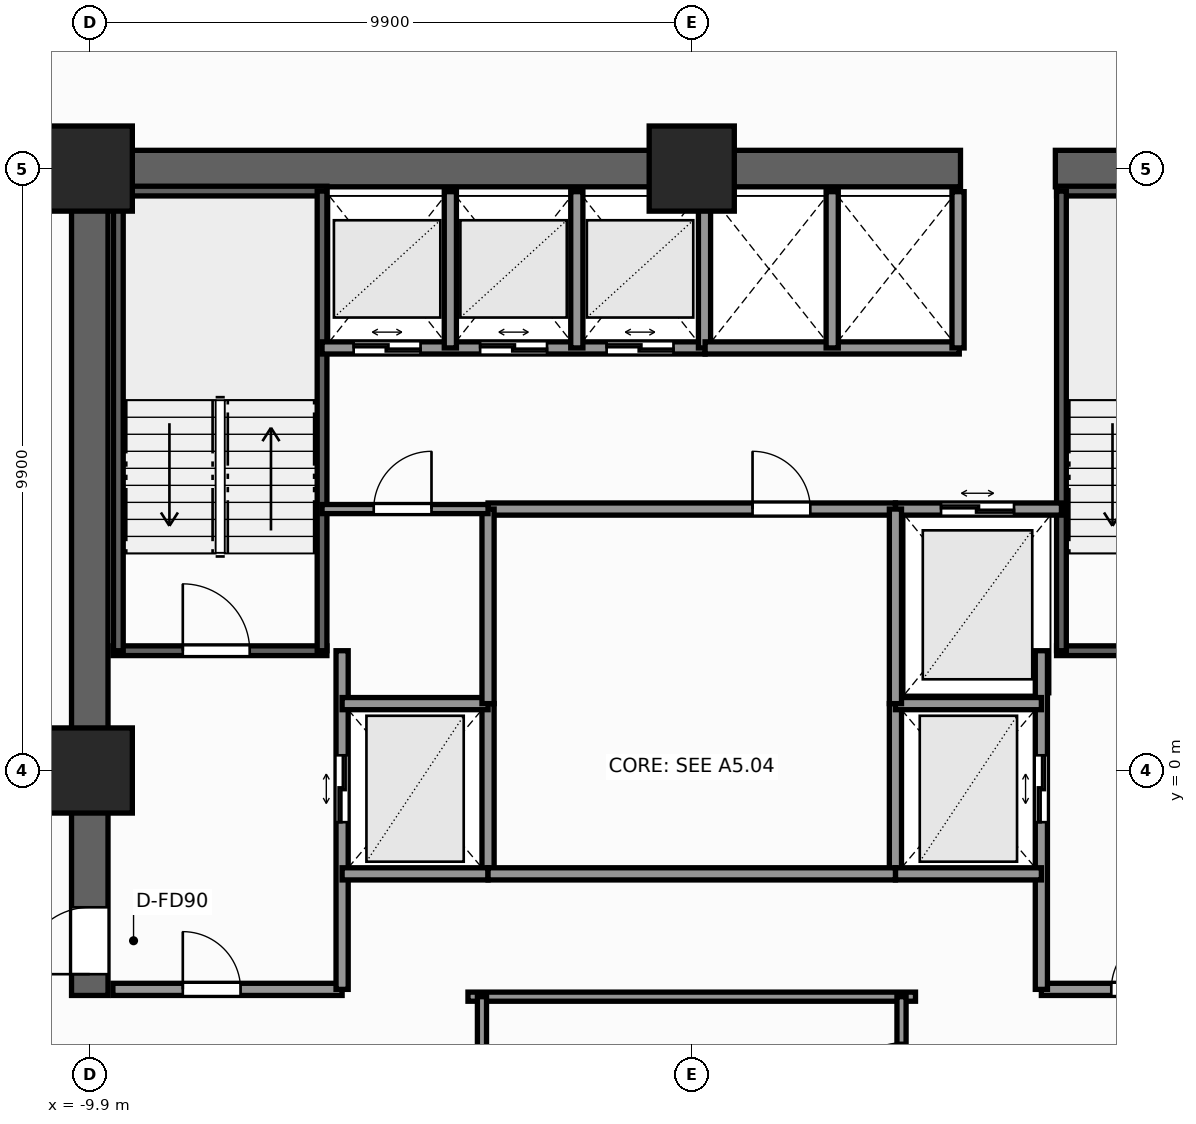
"""IFC4 building model, lengths in metres.
Left out: names, types, materials, properties, quantities, classifications, styles, units other than length and angle.
Written with IfcOpenShell. Run it as: python <this file> out.ifc"""

import sys

from ifc_helpers import new_model, si_unit, direction, frame, frame_2d, origin, origin_2d, place, context, subcontext, project, spatial, rectangle, extrude, element, fill, save


model = new_model("IFC4")
c1 = context("Model", 3, precision=1e-05, world=origin(), true_north=direction((0.0, 1.0)))
c2 = subcontext(c1, "Body", "Model", "MODEL_VIEW")
j1 = project(units=[si_unit("LENGTHUNIT", "METRE"), si_unit("PLANEANGLEUNIT", "RADIAN")], contexts=[c1])
p1 = place(None, origin())
s1 = spatial("IfcSite", under=j1, at=p1, CompositionType="ELEMENT")
p2 = place(p1, origin())
s2 = spatial("IfcBuilding", under=s1, at=p2, CompositionType="ELEMENT")
p3 = place(p2, frame((0.0, 0.0, 30.4)))
s3 = spatial("IfcBuildingStorey", under=s2, at=p3, CompositionType="ELEMENT", Elevation=30.4)
p4 = place(p3, frame((-10.2, 9.9, 0.0), z_axis=(0.0, 0.0, 1.0), x_axis=(1.0, 0.0, 0.0)))
e1 = element("IfcWall", 1, at=p4, inside=s3, PredefinedType="SHEAR", context=c2, shape_type="SweptSolid", body=[
    extrude(rectangle(XDim=14.62, YDim=0.6, at=frame_2d((7.31, 0.0))), origin(), (0.0, 0.0, 1.0), 3.3),
])
p5 = place(p3, frame((5.98, 9.9, 0.0), z_axis=(0.0, 0.0, 1.0), x_axis=(1.0, 0.0, 0.0)))
e2 = element("IfcWall", 2, at=p5, inside=s3, PredefinedType="SHEAR", context=c2, shape_type="SweptSolid", body=[
    extrude(rectangle(XDim=4.22, YDim=0.6, at=frame_2d((2.11, 0.0))), origin(), (0.0, 0.0, 1.0), 3.3),
])
p6 = place(p3, frame((-9.9, -3.7, 0.0), z_axis=(0.0, 0.0, 1.0), x_axis=(0.0, 1.0, 0.0)))
e3 = element("IfcWall", 3, at=p6, inside=s3, PredefinedType="SHEAR", context=c2, shape_type="SweptSolid", body=[
    extrude(rectangle(XDim=13.3, YDim=0.6, at=frame_2d((6.65, 0.0))), origin(), (0.0, 0.0, 1.0), 3.3),
])
p7 = place(p6, frame((0.35, 0.0, 0.0)))
e4 = element("IfcOpeningElement", 4, at=p7, cuts=e3, PredefinedType="OPENING", context=c2, shape_type="SweptSolid", body=[
    extrude(rectangle(XDim=1.1, YDim=2.2, at=frame_2d((0.55, 1.1))), frame((0.0, 0.31, 0.0), z_axis=(0.0, -1.0, 0.0), x_axis=(1.0, 0.0, 0.0)), (0.0, 0.0, 1.0), 0.62),
])
for number, where, z_axis, x_axis in (
    (5, (-9.9, 9.9, 0.0), (0.0, 0.0, 1.0), (1.0, 0.0, 0.0)),
    (6, (0.0, 9.9, 0.0), (0.0, 0.0, 1.0), (1.0, 0.0, 0.0)),
    (7, (-9.9, 0.0, 0.0), (0.0, 0.0, 1.0), (1.0, 0.0, 0.0)),
):
    element("IfcColumn", number, at=place(p3, frame(where, z_axis=z_axis, x_axis=x_axis)), inside=s3, PredefinedType="COLUMN", context=c2, shape_type="SweptSolid", body=[
        extrude(rectangle(XDim=1.4, YDim=1.4, at=origin_2d()), origin(), (0.0, 0.0, 1.0), 3.3),
    ])
p8 = place(p3, frame((-9.52, 1.97, 0.0), z_axis=(0.0, 0.0, 1.0), x_axis=(1.0, 0.0, 0.0)))
e8 = element("IfcWall", 8, at=p8, inside=s3, PredefinedType="SHEAR", context=c2, shape_type="SweptSolid", body=[
    extrude(rectangle(XDim=3.52, YDim=0.16, at=frame_2d((1.76, 0.0))), origin(), (0.0, 0.0, 1.0), 3.3),
])
p9 = place(p8, frame((1.15, 0.0, 0.0)))
e9 = element("IfcOpeningElement", 9, at=p9, cuts=e8, PredefinedType="OPENING", context=c2, shape_type="SweptSolid", body=[
    extrude(rectangle(XDim=1.1, YDim=2.2, at=frame_2d((0.55, 1.1))), frame((0.0, 0.09, 0.0), z_axis=(0.0, -1.0, 0.0), x_axis=(1.0, 0.0, 0.0)), (0.0, 0.0, 1.0), 0.18),
])
p10 = place(p3, frame((-9.52, 9.53, 0.0), z_axis=(0.0, 0.0, 1.0), x_axis=(1.0, 0.0, 0.0)))
e10 = element("IfcWall", 10, at=p10, inside=s3, PredefinedType="SHEAR", context=c2, shape_type="SweptSolid", body=[
    extrude(rectangle(XDim=3.52, YDim=0.16, at=frame_2d((1.76, 0.0))), origin(), (0.0, 0.0, 1.0), 3.3),
])
for number, where, z_axis, x_axis in (
    (11, (-9.43, 1.97, 0.0), (0.0, 0.0, 1.0), (0.0, 1.0, 0.0)),
    (12, (-6.08, 1.97, 0.0), (0.0, 0.0, 1.0), (0.0, 1.0, 0.0)),
):
    element("IfcWall", number, at=place(p3, frame(where, z_axis=z_axis, x_axis=x_axis)), inside=s3, PredefinedType="SHEAR", context=c2, shape_type="SweptSolid", body=[
        extrude(rectangle(XDim=7.56, YDim=0.16, at=frame_2d((3.78, 0.0))), origin(), (0.0, 0.0, 1.0), 3.3),
    ])
p11 = place(p3, frame((6.0, 1.97, 0.0), z_axis=(0.0, 0.0, 1.0), x_axis=(1.0, 0.0, 0.0)))
e13 = element("IfcWall", 13, at=p11, inside=s3, PredefinedType="SHEAR", context=c2, shape_type="SweptSolid", body=[
    extrude(rectangle(XDim=3.52, YDim=0.16, at=frame_2d((1.76, 0.0))), origin(), (0.0, 0.0, 1.0), 3.3),
])
p12 = place(p11, frame((1.15, 0.0, 0.0)))
e14 = element("IfcOpeningElement", 14, at=p12, cuts=e13, PredefinedType="OPENING", context=c2, shape_type="SweptSolid", body=[
    extrude(rectangle(XDim=1.1, YDim=2.2, at=frame_2d((0.55, 1.1))), frame((0.0, 0.09, 0.0), z_axis=(0.0, -1.0, 0.0), x_axis=(1.0, 0.0, 0.0)), (0.0, 0.0, 1.0), 0.18),
])
p13 = place(p3, frame((6.0, 9.53, 0.0), z_axis=(0.0, 0.0, 1.0), x_axis=(1.0, 0.0, 0.0)))
e15 = element("IfcWall", 15, at=p13, inside=s3, PredefinedType="SHEAR", context=c2, shape_type="SweptSolid", body=[
    extrude(rectangle(XDim=3.52, YDim=0.16, at=frame_2d((1.76, 0.0))), origin(), (0.0, 0.0, 1.0), 3.3),
])
p14 = place(p3, frame((6.08, 1.97, 0.0), z_axis=(0.0, 0.0, 1.0), x_axis=(0.0, 1.0, 0.0)))
e16 = element("IfcWall", 16, at=p14, inside=s3, PredefinedType="SHEAR", context=c2, shape_type="SweptSolid", body=[
    extrude(rectangle(XDim=7.56, YDim=0.16, at=frame_2d((3.78, 0.0))), origin(), (0.0, 0.0, 1.0), 3.3),
])
p15 = place(p3, frame((-9.52, -3.6, 0.0), z_axis=(0.0, 0.0, 1.0), x_axis=(1.0, 0.0, 0.0)))
e17 = element("IfcWall", 17, at=p15, inside=s3, PredefinedType="SOLIDWALL", context=c2, shape_type="SweptSolid", body=[
    extrude(rectangle(XDim=3.77, YDim=0.2, at=frame_2d((1.885, 0.0))), origin(), (0.0, 0.0, 1.0), 3.06),
])
p16 = place(p15, frame((1.15, 0.0, 0.0)))
e18 = element("IfcOpeningElement", 18, at=p16, cuts=e17, PredefinedType="OPENING", context=c2, shape_type="SweptSolid", body=[
    extrude(rectangle(XDim=0.95, YDim=2.06, at=frame_2d((0.475, 1.03))), frame((0.0, 0.11, 0.0), z_axis=(0.0, -1.0, 0.0), x_axis=(1.0, 0.0, 0.0)), (0.0, 0.0, 1.0), 0.22),
])
p17 = place(p3, frame((-5.75, -3.6, 0.0), z_axis=(0.0, 0.0, 1.0), x_axis=(0.0, 1.0, 0.0)))
e19 = element("IfcWall", 19, at=p17, inside=s3, PredefinedType="SOLIDWALL", context=c2, shape_type="SweptSolid", body=[
    extrude(rectangle(XDim=5.57, YDim=0.2, at=frame_2d((2.785, 0.0))), origin(), (0.0, 0.0, 1.0), 3.06),
])
p18 = place(p17, frame((2.75, 0.0, 0.0)))
e20 = element("IfcOpeningElement", 20, at=p18, cuts=e19, PredefinedType="OPENING", context=c2, shape_type="SweptSolid", body=[
    extrude(rectangle(XDim=1.1, YDim=2.2, at=frame_2d((0.55, 1.1))), frame((0.0, 0.11, 0.0), z_axis=(0.0, -1.0, 0.0), x_axis=(1.0, 0.0, 0.0)), (0.0, 0.0, 1.0), 0.22),
])
p19 = place(p3, frame((-3.35, -1.7, 0.0), z_axis=(0.0, 0.0, 1.0), x_axis=(0.0, 1.0, 0.0)))
e21 = element("IfcWall", 21, at=p19, inside=s3, PredefinedType="SOLIDWALL", context=c2, shape_type="SweptSolid", body=[
    extrude(rectangle(XDim=2.8, YDim=0.2, at=frame_2d((1.4, 0.0))), origin(), (0.0, 0.0, 1.0), 3.06),
])
for number, where, z_axis, x_axis in (
    (22, (-5.75, -1.7, 0.0), (0.0, 0.0, 1.0), (1.0, 0.0, 0.0)),
    (23, (-5.75, 1.1, 0.0), (0.0, 0.0, 1.0), (1.0, 0.0, 0.0)),
):
    element("IfcWall", number, at=place(p3, frame(where, z_axis=z_axis, x_axis=x_axis)), inside=s3, PredefinedType="SOLIDWALL", context=c2, shape_type="SweptSolid", body=[
        extrude(rectangle(XDim=2.4, YDim=0.2, at=frame_2d((1.2, 0.0))), origin(), (0.0, 0.0, 1.0), 3.06),
    ])
p20 = place(p3, frame((5.75, -3.6, 0.0), z_axis=(0.0, 0.0, 1.0), x_axis=(1.0, 0.0, 0.0)))
e24 = element("IfcWall", 24, at=p20, inside=s3, PredefinedType="SOLIDWALL", context=c2, shape_type="SweptSolid", body=[
    extrude(rectangle(XDim=3.77, YDim=0.2, at=frame_2d((1.885, 0.0))), origin(), (0.0, 0.0, 1.0), 3.06),
])
p21 = place(p20, frame((1.15, 0.0, 0.0)))
e25 = element("IfcOpeningElement", 25, at=p21, cuts=e24, PredefinedType="OPENING", context=c2, shape_type="SweptSolid", body=[
    extrude(rectangle(XDim=0.95, YDim=2.06, at=frame_2d((0.475, 1.03))), frame((0.0, 0.11, 0.0), z_axis=(0.0, -1.0, 0.0), x_axis=(1.0, 0.0, 0.0)), (0.0, 0.0, 1.0), 0.22),
])
p22 = place(p3, frame((5.75, -3.6, 0.0), z_axis=(0.0, 0.0, 1.0), x_axis=(0.0, 1.0, 0.0)))
e26 = element("IfcWall", 26, at=p22, inside=s3, PredefinedType="SOLIDWALL", context=c2, shape_type="SweptSolid", body=[
    extrude(rectangle(XDim=5.57, YDim=0.2, at=frame_2d((2.785, 0.0))), origin(), (0.0, 0.0, 1.0), 3.06),
])
p23 = place(p22, frame((2.75, 0.0, 0.0)))
e27 = element("IfcOpeningElement", 27, at=p23, cuts=e26, PredefinedType="OPENING", context=c2, shape_type="SweptSolid", body=[
    extrude(rectangle(XDim=1.1, YDim=2.2, at=frame_2d((0.55, 1.1))), frame((0.0, 0.11, 0.0), z_axis=(0.0, -1.0, 0.0), x_axis=(1.0, 0.0, 0.0)), (0.0, 0.0, 1.0), 0.22),
])
p24 = place(p3, frame((3.35, -1.7, 0.0), z_axis=(0.0, 0.0, 1.0), x_axis=(0.0, 1.0, 0.0)))
e28 = element("IfcWall", 28, at=p24, inside=s3, PredefinedType="SOLIDWALL", context=c2, shape_type="SweptSolid", body=[
    extrude(rectangle(XDim=2.8, YDim=0.2, at=frame_2d((1.4, 0.0))), origin(), (0.0, 0.0, 1.0), 3.06),
])
for number, where, z_axis, x_axis in (
    (29, (3.35, -1.7, 0.0), (0.0, 0.0, 1.0), (1.0, 0.0, 0.0)),
    (30, (3.35, 1.1, 0.0), (0.0, 0.0, 1.0), (1.0, 0.0, 0.0)),
):
    element("IfcWall", number, at=place(p3, frame(where, z_axis=z_axis, x_axis=x_axis)), inside=s3, PredefinedType="SOLIDWALL", context=c2, shape_type="SweptSolid", body=[
        extrude(rectangle(XDim=2.4, YDim=0.2, at=frame_2d((1.2, 0.0))), origin(), (0.0, 0.0, 1.0), 3.06),
    ])
p25 = place(p3, frame((3.35, 4.3, 0.0), z_axis=(0.0, 0.0, 1.0), x_axis=(1.0, 0.0, 0.0)))
e31 = element("IfcWall", 31, at=p25, inside=s3, PredefinedType="SOLIDWALL", context=c2, shape_type="SweptSolid", body=[
    extrude(rectangle(XDim=2.73, YDim=0.2, at=frame_2d((1.365, 0.0))), origin(), (0.0, 0.0, 1.0), 3.06),
])
p26 = place(p25, frame((0.75, 0.0, 0.0)))
e32 = element("IfcOpeningElement", 32, at=p26, cuts=e31, PredefinedType="OPENING", context=c2, shape_type="SweptSolid", body=[
    extrude(rectangle(XDim=1.2, YDim=2.25, at=frame_2d((0.6, 1.125))), frame((0.0, 0.11, 0.0), z_axis=(0.0, -1.0, 0.0), x_axis=(1.0, 0.0, 0.0)), (0.0, 0.0, 1.0), 0.22),
])
p27 = place(p3, frame((-6.08, 6.95, 0.0), z_axis=(0.0, 0.0, 1.0), x_axis=(1.0, 0.0, 0.0)))
e33 = element("IfcWall", 33, at=p27, inside=s3, PredefinedType="SOLIDWALL", context=c2, shape_type="SweptSolid", body=[
    extrude(rectangle(XDim=6.3, YDim=0.2, at=frame_2d((3.15, 0.0))), origin(), (0.0, 0.0, 1.0), 3.06),
])
p28 = place(p27, frame((0.52, 0.0, 0.0)))
e34 = element("IfcOpeningElement", 34, at=p28, cuts=e33, PredefinedType="OPENING", context=c2, shape_type="SweptSolid", body=[
    extrude(rectangle(XDim=1.1, YDim=2.2, at=frame_2d((0.55, 1.1))), frame((0.0, 0.11, 0.0), z_axis=(0.0, -1.0, 0.0), x_axis=(1.0, 0.0, 0.0)), (0.0, 0.0, 1.0), 0.22),
])
p29 = place(p27, frame((2.6, 0.0, 0.0)))
e35 = element("IfcOpeningElement", 35, at=p29, cuts=e33, PredefinedType="OPENING", context=c2, shape_type="SweptSolid", body=[
    extrude(rectangle(XDim=1.1, YDim=2.2, at=frame_2d((0.55, 1.1))), frame((0.0, 0.11, 0.0), z_axis=(0.0, -1.0, 0.0), x_axis=(1.0, 0.0, 0.0)), (0.0, 0.0, 1.0), 0.22),
])
p30 = place(p27, frame((4.68, 0.0, 0.0)))
e36 = element("IfcOpeningElement", 36, at=p30, cuts=e33, PredefinedType="OPENING", context=c2, shape_type="SweptSolid", body=[
    extrude(rectangle(XDim=1.1, YDim=2.2, at=frame_2d((0.55, 1.1))), frame((0.0, 0.11, 0.0), z_axis=(0.0, -1.0, 0.0), x_axis=(1.0, 0.0, 0.0)), (0.0, 0.0, 1.0), 0.22),
])
for number, where, z_axis, x_axis in (
    (37, (-3.97, 6.95, 0.0), (0.0, 0.0, 1.0), (0.0, 1.0, 0.0)),
    (38, (-1.89, 6.95, 0.0), (0.0, 0.0, 1.0), (0.0, 1.0, 0.0)),
    (39, (0.21, 6.95, 0.0), (0.0, 0.0, 1.0), (0.0, 1.0, 0.0)),
):
    element("IfcWall", number, at=place(p3, frame(where, z_axis=z_axis, x_axis=x_axis)), inside=s3, PredefinedType="SOLIDWALL", context=c2, shape_type="SweptSolid", body=[
        extrude(rectangle(XDim=2.57, YDim=0.2, at=frame_2d((1.285, 0.0))), origin(), (0.0, 0.0, 1.0), 3.06),
    ])
p31 = place(p3, frame((0.22, 6.95, 0.0), z_axis=(0.0, 0.0, 1.0), x_axis=(1.0, 0.0, 0.0)))
e40 = element("IfcWall", 40, at=p31, inside=s3, PredefinedType="SOLIDWALL", context=c2, shape_type="SweptSolid", body=[
    extrude(rectangle(XDim=4.18, YDim=0.2, at=frame_2d((2.09, 0.0))), origin(), (0.0, 0.0, 1.0), 3.06),
])
for number, where, z_axis, x_axis in (
    (41, (4.38, 6.95, 0.0), (0.0, 0.0, 1.0), (0.0, 1.0, 0.0)),
    (42, (2.31, 6.95, 0.0), (0.0, 0.0, 1.0), (0.0, 1.0, 0.0)),
):
    element("IfcWall", number, at=place(p3, frame(where, z_axis=z_axis, x_axis=x_axis)), inside=s3, PredefinedType="SOLIDWALL", context=c2, shape_type="SweptSolid", body=[
        extrude(rectangle(XDim=2.57, YDim=0.2, at=frame_2d((1.285, 0.0))), origin(), (0.0, 0.0, 1.0), 3.06),
    ])
p32 = place(p3, frame((-3.35, 4.3, 0.0), z_axis=(0.0, 0.0, 1.0), x_axis=(1.0, 0.0, 0.0)))
e43 = element("IfcWall", 43, at=p32, inside=s3, PredefinedType="SOLIDWALL", context=c2, shape_type="SweptSolid", body=[
    extrude(rectangle(XDim=6.7, YDim=0.2, at=frame_2d((3.35, 0.0))), origin(), (0.0, 0.0, 1.0), 3.06),
])
p33 = place(p32, frame((4.35, 0.0, 0.0)))
e44 = element("IfcOpeningElement", 44, at=p33, cuts=e43, PredefinedType="OPENING", context=c2, shape_type="SweptSolid", body=[
    extrude(rectangle(XDim=0.95, YDim=2.06, at=frame_2d((0.475, 1.03))), frame((0.0, 0.11, 0.0), z_axis=(0.0, -1.0, 0.0), x_axis=(1.0, 0.0, 0.0)), (0.0, 0.0, 1.0), 0.22),
])
p34 = place(p3, frame((-3.35, -1.7, 0.0), z_axis=(0.0, 0.0, 1.0), x_axis=(1.0, 0.0, 0.0)))
e45 = element("IfcWall", 45, at=p34, inside=s3, PredefinedType="SOLIDWALL", context=c2, shape_type="SweptSolid", body=[
    extrude(rectangle(XDim=6.7, YDim=0.2, at=frame_2d((3.35, 0.0))), origin(), (0.0, 0.0, 1.0), 3.06),
])
for number, where, z_axis, x_axis in (
    (46, (-3.35, 1.1, 0.0), (0.0, 0.0, 1.0), (0.0, 1.0, 0.0)),
    (47, (3.35, 1.1, 0.0), (0.0, 0.0, 1.0), (0.0, 1.0, 0.0)),
):
    element("IfcWall", number, at=place(p3, frame(where, z_axis=z_axis, x_axis=x_axis)), inside=s3, PredefinedType="SOLIDWALL", context=c2, shape_type="SweptSolid", body=[
        extrude(rectangle(XDim=3.2, YDim=0.2, at=frame_2d((1.6, 0.0))), origin(), (0.0, 0.0, 1.0), 3.06),
    ])
p35 = place(p3, frame((-3.68, -3.72, 0.0), z_axis=(0.0, 0.0, 1.0), x_axis=(1.0, 0.0, 0.0)))
e48 = element("IfcWall", 48, at=p35, inside=s3, PredefinedType="PARTITIONING", context=c2, shape_type="SweptSolid", body=[
    extrude(rectangle(XDim=7.36, YDim=0.15, at=frame_2d((3.68, 0.0))), origin(), (0.0, 0.0, 1.0), 3.06),
])
p36 = place(p3, frame((3.45, -6.08, 0.0), z_axis=(0.0, 0.0, 1.0), x_axis=(0.0, 1.0, 0.0)))
e49 = element("IfcWall", 49, at=p36, inside=s3, PredefinedType="PARTITIONING", context=c2, shape_type="SweptSolid", body=[
    extrude(rectangle(XDim=2.36, YDim=0.15, at=frame_2d((1.18, 0.0))), origin(), (0.0, 0.0, 1.0), 3.06),
])
p37 = place(p36, frame((0.65, 0.0, 0.0)))
e50 = element("IfcOpeningElement", 50, at=p37, cuts=e49, PredefinedType="OPENING", context=c2, shape_type="SweptSolid", body=[
    extrude(rectangle(XDim=0.95, YDim=2.06, at=frame_2d((0.475, 1.03))), frame((0.0, 0.085, 0.0), z_axis=(0.0, -1.0, 0.0), x_axis=(1.0, 0.0, 0.0)), (0.0, 0.0, 1.0), 0.17),
])
p38 = place(p3, frame((-3.45, -6.08, 0.0), z_axis=(0.0, 0.0, 1.0), x_axis=(0.0, 1.0, 0.0)))
e51 = element("IfcWall", 51, at=p38, inside=s3, PredefinedType="PARTITIONING", context=c2, shape_type="SweptSolid", body=[
    extrude(rectangle(XDim=2.36, YDim=0.15, at=frame_2d((1.18, 0.0))), origin(), (0.0, 0.0, 1.0), 3.06),
])
p39 = place(p3, frame((-6.08, 4.3, 0.0), z_axis=(0.0, 0.0, 1.0), x_axis=(1.0, 0.0, 0.0)))
e52 = element("IfcWall", 52, at=p39, inside=s3, PredefinedType="PARTITIONING", context=c2, shape_type="SweptSolid", body=[
    extrude(rectangle(XDim=2.73, YDim=0.15, at=frame_2d((1.365, 0.0))), origin(), (0.0, 0.0, 1.0), 3.06),
])
p40 = place(p39, frame((0.85, 0.0, 0.0)))
e53 = element("IfcOpeningElement", 53, at=p40, cuts=e52, PredefinedType="OPENING", context=c2, shape_type="SweptSolid", body=[
    extrude(rectangle(XDim=0.95, YDim=2.06, at=frame_2d((0.475, 1.03))), frame((0.0, 0.085, 0.0), z_axis=(0.0, -1.0, 0.0), x_axis=(1.0, 0.0, 0.0)), (0.0, 0.0, 1.0), 0.17),
])
p41 = place(p9, origin())
e54 = element("IfcDoor", 54, at=p41, inside=s3, OperationType="SINGLE_SWING_LEFT", PredefinedType="DOOR", context=c2, shape_type="SweptSolid", body=[
    extrude(rectangle(XDim=1.1, YDim=2.2, at=frame_2d((0.55, 1.1))), frame((0.0, 0.025, 0.0), z_axis=(0.0, -1.0, 0.0), x_axis=(1.0, 0.0, 0.0)), (0.0, 0.0, 1.0), 0.05),
])
fill(e9, e54)
p42 = place(p7, origin())
e55 = element("IfcDoor", 55, at=p42, inside=s3, OperationType="SINGLE_SWING_LEFT", PredefinedType="DOOR", context=c2, shape_type="SweptSolid", body=[
    extrude(rectangle(XDim=1.1, YDim=2.2, at=frame_2d((0.55, 1.1))), frame((0.0, 0.025, 0.0), z_axis=(0.0, -1.0, 0.0), x_axis=(1.0, 0.0, 0.0)), (0.0, 0.0, 1.0), 0.05),
])
fill(e4, e55)
p43 = place(p18, origin())
e56 = element("IfcDoor", 56, at=p43, inside=s3, OperationType="DOUBLE_DOOR_SLIDING", PredefinedType="DOOR", context=c2, shape_type="SweptSolid", body=[
    extrude(rectangle(XDim=1.1, YDim=2.2, at=frame_2d((0.55, 1.1))), frame((0.0, 0.025, 0.0), z_axis=(0.0, -1.0, 0.0), x_axis=(1.0, 0.0, 0.0)), (0.0, 0.0, 1.0), 0.05),
])
fill(e20, e56)
p44 = place(p23, origin())
e57 = element("IfcDoor", 57, at=p44, inside=s3, OperationType="DOUBLE_DOOR_SLIDING", PredefinedType="DOOR", context=c2, shape_type="SweptSolid", body=[
    extrude(rectangle(XDim=1.1, YDim=2.2, at=frame_2d((0.55, 1.1))), frame((0.0, 0.025, 0.0), z_axis=(0.0, -1.0, 0.0), x_axis=(1.0, 0.0, 0.0)), (0.0, 0.0, 1.0), 0.05),
])
fill(e27, e57)
p45 = place(p26, origin())
e58 = element("IfcDoor", 58, at=p45, inside=s3, OperationType="DOUBLE_DOOR_SLIDING", PredefinedType="DOOR", context=c2, shape_type="SweptSolid", body=[
    extrude(rectangle(XDim=1.2, YDim=2.25, at=frame_2d((0.6, 1.125))), frame((0.0, 0.025, 0.0), z_axis=(0.0, -1.0, 0.0), x_axis=(1.0, 0.0, 0.0)), (0.0, 0.0, 1.0), 0.05),
])
fill(e32, e58)
p46 = place(p28, origin())
e59 = element("IfcDoor", 59, at=p46, inside=s3, OperationType="DOUBLE_DOOR_SLIDING", PredefinedType="DOOR", context=c2, shape_type="SweptSolid", body=[
    extrude(rectangle(XDim=1.1, YDim=2.2, at=frame_2d((0.55, 1.1))), frame((0.0, 0.025, 0.0), z_axis=(0.0, -1.0, 0.0), x_axis=(1.0, 0.0, 0.0)), (0.0, 0.0, 1.0), 0.05),
])
fill(e34, e59)
p47 = place(p29, origin())
e60 = element("IfcDoor", 60, at=p47, inside=s3, OperationType="DOUBLE_DOOR_SLIDING", PredefinedType="DOOR", context=c2, shape_type="SweptSolid", body=[
    extrude(rectangle(XDim=1.1, YDim=2.2, at=frame_2d((0.55, 1.1))), frame((0.0, 0.025, 0.0), z_axis=(0.0, -1.0, 0.0), x_axis=(1.0, 0.0, 0.0)), (0.0, 0.0, 1.0), 0.05),
])
fill(e35, e60)
p48 = place(p30, origin())
e61 = element("IfcDoor", 61, at=p48, inside=s3, OperationType="DOUBLE_DOOR_SLIDING", PredefinedType="DOOR", context=c2, shape_type="SweptSolid", body=[
    extrude(rectangle(XDim=1.1, YDim=2.2, at=frame_2d((0.55, 1.1))), frame((0.0, 0.025, 0.0), z_axis=(0.0, -1.0, 0.0), x_axis=(1.0, 0.0, 0.0)), (0.0, 0.0, 1.0), 0.05),
])
fill(e36, e61)
p49 = place(p16, origin())
e62 = element("IfcDoor", 62, at=p49, inside=s3, OperationType="SINGLE_SWING_LEFT", PredefinedType="DOOR", context=c2, shape_type="SweptSolid", body=[
    extrude(rectangle(XDim=0.95, YDim=2.06, at=frame_2d((0.475, 1.03))), frame((0.0, 0.025, 0.0), z_axis=(0.0, -1.0, 0.0), x_axis=(1.0, 0.0, 0.0)), (0.0, 0.0, 1.0), 0.05),
])
fill(e18, e62)
p50 = place(p21, origin())
e63 = element("IfcDoor", 63, at=p50, inside=s3, OperationType="SINGLE_SWING_RIGHT", PredefinedType="DOOR", context=c2, shape_type="SweptSolid", body=[
    extrude(rectangle(XDim=0.95, YDim=2.06, at=frame_2d((0.475, 1.03))), frame((0.0, 0.025, 0.0), z_axis=(0.0, -1.0, 0.0), x_axis=(1.0, 0.0, 0.0)), (0.0, 0.0, 1.0), 0.05),
])
fill(e25, e63)
p51 = place(p33, origin())
e64 = element("IfcDoor", 64, at=p51, inside=s3, OperationType="SINGLE_SWING_LEFT", PredefinedType="DOOR", context=c2, shape_type="SweptSolid", body=[
    extrude(rectangle(XDim=0.95, YDim=2.06, at=frame_2d((0.475, 1.03))), frame((0.0, 0.025, 0.0), z_axis=(0.0, -1.0, 0.0), x_axis=(1.0, 0.0, 0.0)), (0.0, 0.0, 1.0), 0.05),
])
fill(e44, e64)
p52 = place(p37, origin())
e65 = element("IfcDoor", 65, at=p52, inside=s3, OperationType="SINGLE_SWING_LEFT", PredefinedType="DOOR", context=c2, shape_type="SweptSolid", body=[
    extrude(rectangle(XDim=0.95, YDim=2.06, at=frame_2d((0.475, 1.03))), frame((0.0, 0.025, 0.0), z_axis=(0.0, -1.0, 0.0), x_axis=(1.0, 0.0, 0.0)), (0.0, 0.0, 1.0), 0.05),
])
fill(e50, e65)
p53 = place(p40, origin())
e66 = element("IfcDoor", 66, at=p53, inside=s3, OperationType="SINGLE_SWING_RIGHT", PredefinedType="DOOR", context=c2, shape_type="SweptSolid", body=[
    extrude(rectangle(XDim=0.95, YDim=2.06, at=frame_2d((0.475, 1.03))), frame((0.0, 0.025, 0.0), z_axis=(0.0, -1.0, 0.0), x_axis=(1.0, 0.0, 0.0)), (0.0, 0.0, 1.0), 0.05),
])
fill(e53, e66)
save(model, sys.argv[1])
